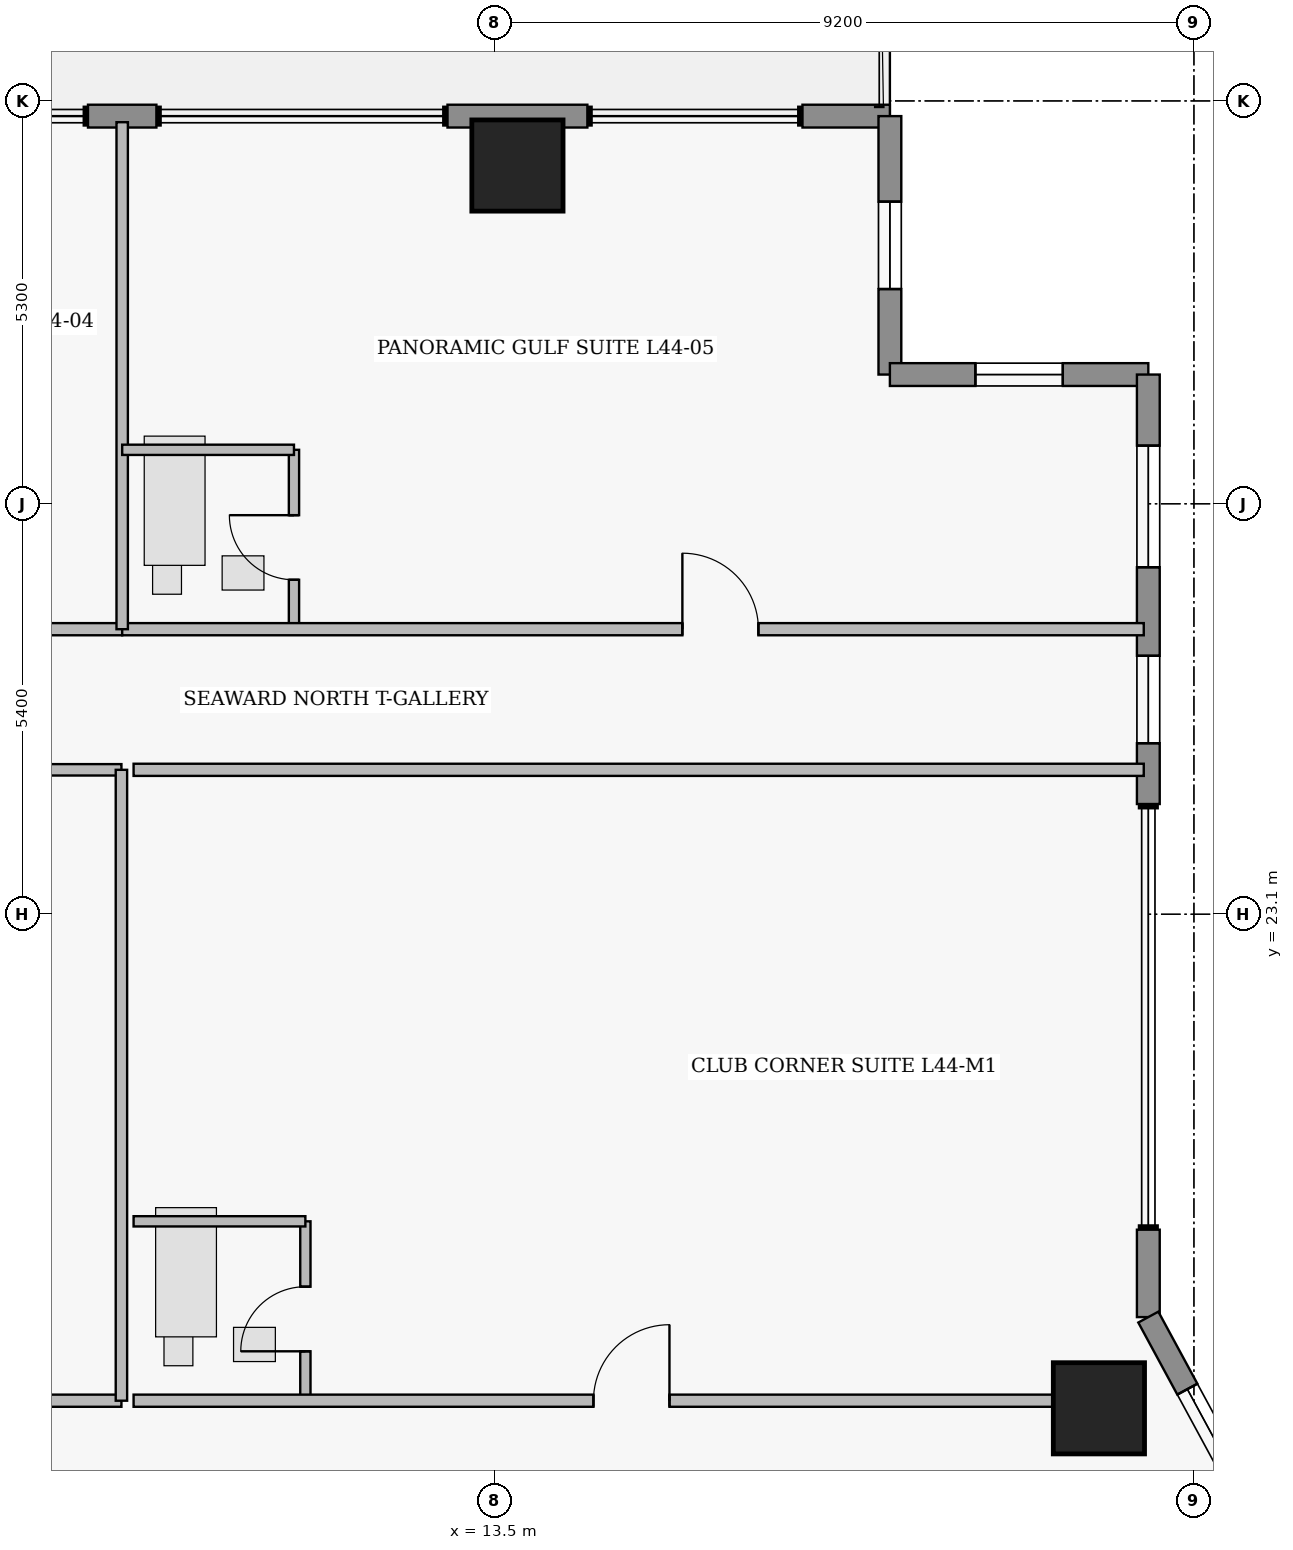
"""IFC4 building model, lengths in metres.
Left out: names, types, materials, properties, quantities, classifications, styles, units other than length and angle.
Written with IfcOpenShell. Run it as: python <this file> out.ifc"""

import sys

from ifc_helpers import new_model, si_unit, direction, frame, frame_2d, origin, origin_2d, place, context, subcontext, project, spatial, rectangle, extrude, element, fill, save


model = new_model("IFC4")
c1 = context("Model", 3, precision=1e-05, world=origin(), true_north=direction((0.0, 1.0)))
c2 = subcontext(c1, "Body", "Model", "MODEL_VIEW")
j1 = project(units=[si_unit("LENGTHUNIT", "METRE"), si_unit("PLANEANGLEUNIT", "RADIAN")], contexts=[c1])
p1 = place(None, origin())
s1 = spatial("IfcSite", under=j1, at=p1, CompositionType="ELEMENT")
p2 = place(p1, origin())
s2 = spatial("IfcBuilding", under=s1, at=p2, CompositionType="ELEMENT")
p3 = place(p2, frame((0.0, 0.0, 177.4)))
s3 = spatial("IfcBuildingStorey", under=s2, at=p3, CompositionType="ELEMENT", Elevation=177.4)
for number, where, z_axis, x_axis in (
    (1, (13.8, 32.95, 0.0), (0.0, 0.0, 1.0), (1.0, 0.0, 0.0)),
    (2, (21.45, 16.6, 0.0), (0.0, 0.0, 1.0), (1.0, 0.0, 0.0)),
):
    element("IfcColumn", number, at=place(p3, frame(where, z_axis=z_axis, x_axis=x_axis)), inside=s3, PredefinedType="COLUMN", context=c2, shape_type="SweptSolid", body=[
        extrude(rectangle(XDim=1.2, YDim=1.2, at=origin_2d()), origin(), (0.0, 0.0, 1.0), 3.75),
    ])
p4 = place(p3, frame((8.15, 33.6, 0.0), z_axis=(0.0, 0.0, 1.0), x_axis=(1.0, 0.0, 0.0)))
e3 = element("IfcWall", 3, at=p4, inside=s3, PredefinedType="STANDARD", context=c2, shape_type="SweptSolid", body=[
    extrude(rectangle(XDim=0.9, YDim=0.3, at=frame_2d((0.45, 0.0))), origin(), (0.0, 0.0, 1.0), 3.53),
])
p5 = place(p3, frame((12.88, 33.6, 0.0), z_axis=(0.0, 0.0, 1.0), x_axis=(1.0, 0.0, 0.0)))
e4 = element("IfcWall", 4, at=p5, inside=s3, PredefinedType="STANDARD", context=c2, shape_type="SweptSolid", body=[
    extrude(rectangle(XDim=1.84, YDim=0.3, at=frame_2d((0.92, 0.0))), origin(), (0.0, 0.0, 1.0), 3.53),
])
p6 = place(p3, frame((17.55, 33.6, 0.0), z_axis=(0.0, 0.0, 1.0), x_axis=(1.0, 0.0, 0.0)))
e5 = element("IfcWall", 5, at=p6, inside=s3, PredefinedType="STANDARD", context=c2, shape_type="SweptSolid", body=[
    extrude(rectangle(XDim=1.15, YDim=0.3, at=frame_2d((0.575, 0.0))), origin(), (0.0, 0.0, 1.0), 3.53),
])
p7 = place(p3, frame((18.7, 33.6, 0.0), z_axis=(0.0, 0.0, 1.0), x_axis=(0.0, -1.0, 0.0)))
e6 = element("IfcWall", 6, at=p7, inside=s3, PredefinedType="STANDARD", context=c2, shape_type="SweptSolid", body=[
    extrude(rectangle(XDim=3.4, YDim=0.3, at=frame_2d((1.7, 0.0))), origin(), (0.0, 0.0, 1.0), 3.53),
])
p8 = place(p7, frame((1.125, 0.0, 1.25)))
e7 = element("IfcOpeningElement", 7, at=p8, cuts=e6, PredefinedType="OPENING", context=c2, shape_type="SweptSolid", body=[
    extrude(rectangle(XDim=1.15, YDim=1.55, at=frame_2d((0.575, 0.775))), frame((0.0, 0.16, 0.0), z_axis=(0.0, -1.0, 0.0), x_axis=(1.0, 0.0, 0.0)), (0.0, 0.0, 1.0), 0.32),
])
p9 = place(p3, frame((18.7, 30.2, 0.0), z_axis=(0.0, 0.0, 1.0), x_axis=(1.0, 0.0, 0.0)))
e8 = element("IfcWall", 8, at=p9, inside=s3, PredefinedType="STANDARD", context=c2, shape_type="SweptSolid", body=[
    extrude(rectangle(XDim=3.4, YDim=0.3, at=frame_2d((1.7, 0.0))), origin(), (0.0, 0.0, 1.0), 3.53),
])
p10 = place(p9, frame((1.125, 0.0, 1.25)))
e9 = element("IfcOpeningElement", 9, at=p10, cuts=e8, PredefinedType="OPENING", context=c2, shape_type="SweptSolid", body=[
    extrude(rectangle(XDim=1.15, YDim=1.55, at=frame_2d((0.575, 0.775))), frame((0.0, 0.16, 0.0), z_axis=(0.0, -1.0, 0.0), x_axis=(1.0, 0.0, 0.0)), (0.0, 0.0, 1.0), 0.32),
])
p11 = place(p3, frame((22.1, 30.2, 0.0), z_axis=(0.0, 0.0, 1.0), x_axis=(0.0, -1.0, 0.0)))
e10 = element("IfcWall", 10, at=p11, inside=s3, PredefinedType="STANDARD", context=c2, shape_type="SweptSolid", body=[
    extrude(rectangle(XDim=5.65, YDim=0.3, at=frame_2d((2.825, 0.0))), origin(), (0.0, 0.0, 1.0), 3.53),
])
p12 = place(p11, frame((0.935, 0.0, 0.85)))
e11 = element("IfcOpeningElement", 11, at=p12, cuts=e10, PredefinedType="OPENING", context=c2, shape_type="SweptSolid", body=[
    extrude(rectangle(XDim=1.6, YDim=1.8, at=frame_2d((0.8, 0.9))), frame((0.0, 0.16, 0.0), z_axis=(0.0, -1.0, 0.0), x_axis=(1.0, 0.0, 0.0)), (0.0, 0.0, 1.0), 0.32),
])
p13 = place(p11, frame((3.7, 0.0, 0.95)))
e12 = element("IfcOpeningElement", 12, at=p13, cuts=e10, PredefinedType="OPENING", context=c2, shape_type="SweptSolid", body=[
    extrude(rectangle(XDim=1.15, YDim=1.55, at=frame_2d((0.575, 0.775))), frame((0.0, 0.16, 0.0), z_axis=(0.0, -1.0, 0.0), x_axis=(1.0, 0.0, 0.0)), (0.0, 0.0, 1.0), 0.32),
])
p14 = place(p3, frame((22.1, 18.95, 0.0), z_axis=(0.0, 0.0, 1.0), x_axis=(0.0, -1.0, 0.0)))
e13 = element("IfcWall", 13, at=p14, inside=s3, PredefinedType="STANDARD", context=c2, shape_type="SweptSolid", body=[
    extrude(rectangle(XDim=1.15, YDim=0.3, at=frame_2d((0.575, 0.0))), origin(), (0.0, 0.0, 1.0), 3.53),
])
p15 = place(p3, frame((22.1, 17.8, 0.0), z_axis=(0.0, 0.0, 1.0), x_axis=(0.476258655584, -0.879305233114, 0.0)))
e14 = element("IfcWall", 14, at=p15, inside=s3, PredefinedType="STANDARD", context=c2, shape_type="SweptSolid", body=[
    extrude(rectangle(XDim=5.459, YDim=0.3, at=frame_2d((2.729, 0.0))), origin(), (0.0, 0.0, 1.0), 3.53),
])
p16 = place(p15, frame((1.078, 0.0, 1.25)))
e15 = element("IfcOpeningElement", 15, at=p16, cuts=e14, PredefinedType="OPENING", context=c2, shape_type="SweptSolid", body=[
    extrude(rectangle(XDim=1.15, YDim=1.55, at=frame_2d((0.575, 0.775))), frame((0.0, 0.16, 0.0), z_axis=(0.0, -1.0, 0.0), x_axis=(1.0, 0.0, 0.0)), (0.0, 0.0, 1.0), 0.32),
])
p17 = place(p3, frame((1.8, 26.85, 0.0), z_axis=(0.0, 0.0, 1.0), x_axis=(1.0, 0.0, 0.0)))
e16 = element("IfcWall", 16, at=p17, inside=s3, PredefinedType="PARTITIONING", context=c2, shape_type="SweptSolid", body=[
    extrude(rectangle(XDim=6.8, YDim=0.16, at=frame_2d((3.4, 0.0))), origin(), (0.0, 0.0, 1.0), 3.53),
])
p18 = place(p17, frame((4.05, 0.0, 0.0)))
e17 = element("IfcOpeningElement", 17, at=p18, cuts=e16, PredefinedType="OPENING", context=c2, shape_type="SweptSolid", body=[
    extrude(rectangle(XDim=1.0, YDim=2.15, at=frame_2d((0.5, 1.075))), frame((0.0, 0.09, 0.0), z_axis=(0.0, -1.0, 0.0), x_axis=(1.0, 0.0, 0.0)), (0.0, 0.0, 1.0), 0.18),
])
p19 = place(p3, frame((10.86, 26.85, 0.0), z_axis=(0.0, 0.0, 1.0), x_axis=(0.0, 1.0, 0.0)))
e18 = element("IfcWall", 18, at=p19, inside=s3, PredefinedType="PLUMBINGWALL", context=c2, shape_type="SweptSolid", body=[
    extrude(rectangle(XDim=2.36, YDim=0.135, at=frame_2d((1.18, 0.0))), origin(), (0.0, 0.0, 1.0), 3.53),
])
p20 = place(p19, frame((0.65, 0.0, 0.0)))
e19 = element("IfcOpeningElement", 19, at=p20, cuts=e18, PredefinedType="OPENING", context=c2, shape_type="SweptSolid", body=[
    extrude(rectangle(XDim=0.85, YDim=2.1, at=frame_2d((0.425, 1.05))), frame((0.0, 0.077, 0.0), z_axis=(0.0, -1.0, 0.0), x_axis=(1.0, 0.0, 0.0)), (0.0, 0.0, 1.0), 0.155),
])
p21 = place(p3, frame((8.6, 26.85, 0.0), z_axis=(0.0, 0.0, 1.0), x_axis=(1.0, 0.0, 0.0)))
e20 = element("IfcWall", 20, at=p21, inside=s3, PredefinedType="PARTITIONING", context=c2, shape_type="SweptSolid", body=[
    extrude(rectangle(XDim=13.44, YDim=0.16, at=frame_2d((6.72, 0.0))), origin(), (0.0, 0.0, 1.0), 3.53),
])
p22 = place(p21, frame((7.37, 0.0, 0.0)))
e21 = element("IfcOpeningElement", 21, at=p22, cuts=e20, PredefinedType="OPENING", context=c2, shape_type="SweptSolid", body=[
    extrude(rectangle(XDim=1.0, YDim=2.15, at=frame_2d((0.5, 1.075))), frame((0.0, 0.09, 0.0), z_axis=(0.0, -1.0, 0.0), x_axis=(1.0, 0.0, 0.0)), (0.0, 0.0, 1.0), 0.18),
])
p23 = place(p3, frame((0.98, 16.7, 0.0), z_axis=(0.0, 0.0, 1.0), x_axis=(1.0, 0.0, 0.0)))
e22 = element("IfcWall", 22, at=p23, inside=s3, PredefinedType="PARTITIONING", context=c2, shape_type="SweptSolid", body=[
    extrude(rectangle(XDim=7.61, YDim=0.16, at=frame_2d((3.805, 0.0))), origin(), (0.0, 0.0, 1.0), 3.124),
])
p24 = place(p23, frame((5.43, 0.0, 0.0)))
e23 = element("IfcOpeningElement", 23, at=p24, cuts=e22, PredefinedType="OPENING", context=c2, shape_type="SweptSolid", body=[
    extrude(rectangle(XDim=1.08, YDim=2.18, at=frame_2d((0.54, 1.09))), frame((0.0, 0.09, 0.0), z_axis=(0.0, -1.0, 0.0), x_axis=(1.0, 0.0, 0.0)), (0.0, 0.0, 1.0), 0.18),
])
p25 = place(p3, frame((11.01, 16.7, 0.0), z_axis=(0.0, 0.0, 1.0), x_axis=(0.0, 1.0, 0.0)))
e24 = element("IfcWall", 24, at=p25, inside=s3, PredefinedType="PLUMBINGWALL", context=c2, shape_type="SweptSolid", body=[
    extrude(rectangle(XDim=2.36, YDim=0.135, at=frame_2d((1.18, 0.0))), origin(), (0.0, 0.0, 1.0), 3.53),
])
p26 = place(p25, frame((0.65, 0.0, 0.0)))
e25 = element("IfcOpeningElement", 25, at=p26, cuts=e24, PredefinedType="OPENING", context=c2, shape_type="SweptSolid", body=[
    extrude(rectangle(XDim=0.85, YDim=2.1, at=frame_2d((0.425, 1.05))), frame((0.0, 0.077, 0.0), z_axis=(0.0, -1.0, 0.0), x_axis=(1.0, 0.0, 0.0)), (0.0, 0.0, 1.0), 0.155),
])
p27 = place(p3, frame((8.75, 16.7, 0.0), z_axis=(0.0, 0.0, 1.0), x_axis=(1.0, 0.0, 0.0)))
e26 = element("IfcWall", 26, at=p27, inside=s3, PredefinedType="PARTITIONING", context=c2, shape_type="SweptSolid", body=[
    extrude(rectangle(XDim=13.29, YDim=0.16, at=frame_2d((6.645, 0.0))), origin(), (0.0, 0.0, 1.0), 3.124),
])
p28 = place(p27, frame((6.05, 0.0, 0.0)))
e27 = element("IfcOpeningElement", 27, at=p28, cuts=e26, PredefinedType="OPENING", context=c2, shape_type="SweptSolid", body=[
    extrude(rectangle(XDim=1.0, YDim=2.15, at=frame_2d((0.5, 1.075))), frame((0.0, 0.09, 0.0), z_axis=(0.0, -1.0, 0.0), x_axis=(1.0, 0.0, 0.0)), (0.0, 0.0, 1.0), 0.18),
])
p29 = place(p3, frame((8.6, 26.85, 0.0), z_axis=(0.0, 0.0, 1.0), x_axis=(0.0, 1.0, 0.0)))
e28 = element("IfcWall", 28, at=p29, inside=s3, PredefinedType="PARTITIONING", context=c2, shape_type="SweptSolid", body=[
    extrude(rectangle(XDim=6.67, YDim=0.15, at=frame_2d((3.335, 0.0))), origin(), (0.0, 0.0, 1.0), 3.53),
])
p30 = place(p3, frame((8.6, 29.21, 0.0), z_axis=(0.0, 0.0, 1.0), x_axis=(1.0, 0.0, 0.0)))
e29 = element("IfcWall", 29, at=p30, inside=s3, PredefinedType="PLUMBINGWALL", context=c2, shape_type="SweptSolid", body=[
    extrude(rectangle(XDim=2.26, YDim=0.135, at=frame_2d((1.13, 0.0))), origin(), (0.0, 0.0, 1.0), 3.53),
])
p31 = place(p3, frame((0.98, 25.0, 0.0), z_axis=(0.0, 0.0, 1.0), x_axis=(1.0, 0.0, 0.0)))
e30 = element("IfcWall", 30, at=p31, inside=s3, PredefinedType="PARTITIONING", context=c2, shape_type="SweptSolid", body=[
    extrude(rectangle(XDim=7.61, YDim=0.15, at=frame_2d((3.805, 0.0))), origin(), (0.0, 0.0, 1.0), 3.124),
])
p32 = place(p3, frame((8.59, 16.7, 0.0), z_axis=(0.0, 0.0, 1.0), x_axis=(0.0, 1.0, 0.0)))
e31 = element("IfcWall", 31, at=p32, inside=s3, PredefinedType="PARTITIONING", context=c2, shape_type="SweptSolid", body=[
    extrude(rectangle(XDim=8.3, YDim=0.15, at=frame_2d((4.15, 0.0))), origin(), (0.0, 0.0, 1.0), 3.53),
])
p33 = place(p3, frame((8.75, 19.06, 0.0), z_axis=(0.0, 0.0, 1.0), x_axis=(1.0, 0.0, 0.0)))
e32 = element("IfcWall", 32, at=p33, inside=s3, PredefinedType="PLUMBINGWALL", context=c2, shape_type="SweptSolid", body=[
    extrude(rectangle(XDim=2.26, YDim=0.135, at=frame_2d((1.13, 0.0))), origin(), (0.0, 0.0, 1.0), 3.124),
])
p34 = place(p3, frame((8.75, 25.0, 0.0), z_axis=(0.0, 0.0, 1.0), x_axis=(1.0, 0.0, 0.0)))
e33 = element("IfcWall", 33, at=p34, inside=s3, PredefinedType="PARTITIONING", context=c2, shape_type="SweptSolid", body=[
    extrude(rectangle(XDim=13.29, YDim=0.16, at=frame_2d((6.645, 0.0))), origin(), (0.0, 0.0, 1.0), 3.124),
])
p35 = place(p8, origin())
e34 = element("IfcWindow", 34, at=p35, inside=s3, PartitioningType="SINGLE_PANEL", PredefinedType="WINDOW", context=c2, shape_type="SweptSolid", body=[
    extrude(rectangle(XDim=1.15, YDim=1.55, at=frame_2d((0.575, 0.775))), frame((0.0, 0.03, 0.0), z_axis=(0.0, -1.0, 0.0), x_axis=(1.0, 0.0, 0.0)), (0.0, 0.0, 1.0), 0.06),
])
fill(e7, e34)
p36 = place(p10, origin())
e35 = element("IfcWindow", 35, at=p36, inside=s3, PartitioningType="SINGLE_PANEL", PredefinedType="WINDOW", context=c2, shape_type="SweptSolid", body=[
    extrude(rectangle(XDim=1.15, YDim=1.55, at=frame_2d((0.575, 0.775))), frame((0.0, 0.03, 0.0), z_axis=(0.0, -1.0, 0.0), x_axis=(1.0, 0.0, 0.0)), (0.0, 0.0, 1.0), 0.06),
])
fill(e9, e35)
p37 = place(p12, origin())
e36 = element("IfcWindow", 36, at=p37, inside=s3, PartitioningType="SINGLE_PANEL", PredefinedType="WINDOW", context=c2, shape_type="SweptSolid", body=[
    extrude(rectangle(XDim=1.6, YDim=1.8, at=frame_2d((0.8, 0.9))), frame((0.0, 0.03, 0.0), z_axis=(0.0, -1.0, 0.0), x_axis=(1.0, 0.0, 0.0)), (0.0, 0.0, 1.0), 0.06),
])
fill(e11, e36)
p38 = place(p13, origin())
e37 = element("IfcWindow", 37, at=p38, inside=s3, PartitioningType="SINGLE_PANEL", PredefinedType="WINDOW", context=c2, shape_type="SweptSolid", body=[
    extrude(rectangle(XDim=1.15, YDim=1.55, at=frame_2d((0.575, 0.775))), frame((0.0, 0.03, 0.0), z_axis=(0.0, -1.0, 0.0), x_axis=(1.0, 0.0, 0.0)), (0.0, 0.0, 1.0), 0.06),
])
fill(e12, e37)
p39 = place(p16, origin())
e38 = element("IfcWindow", 38, at=p39, inside=s3, PartitioningType="SINGLE_PANEL", PredefinedType="WINDOW", context=c2, shape_type="SweptSolid", body=[
    extrude(rectangle(XDim=1.15, YDim=1.55, at=frame_2d((0.575, 0.775))), frame((0.0, 0.03, 0.0), z_axis=(0.0, -1.0, 0.0), x_axis=(1.0, 0.0, 0.0)), (0.0, 0.0, 1.0), 0.06),
])
fill(e15, e38)
p40 = place(p20, origin())
e39 = element("IfcDoor", 39, at=p40, inside=s3, OperationType="SINGLE_SWING_RIGHT", PredefinedType="DOOR", context=c2, shape_type="SweptSolid", body=[
    extrude(rectangle(XDim=0.85, YDim=2.1, at=frame_2d((0.425, 1.05))), frame((0.0, 0.025, 0.0), z_axis=(0.0, -1.0, 0.0), x_axis=(1.0, 0.0, 0.0)), (0.0, 0.0, 1.0), 0.05),
])
fill(e19, e39)
p41 = place(p22, origin())
e40 = element("IfcDoor", 40, at=p41, inside=s3, OperationType="SINGLE_SWING_LEFT", PredefinedType="DOOR", context=c2, shape_type="SweptSolid", body=[
    extrude(rectangle(XDim=1.0, YDim=2.15, at=frame_2d((0.5, 1.075))), frame((0.0, 0.025, 0.0), z_axis=(0.0, -1.0, 0.0), x_axis=(1.0, 0.0, 0.0)), (0.0, 0.0, 1.0), 0.05),
])
fill(e21, e40)
p42 = place(p26, origin())
e41 = element("IfcDoor", 41, at=p42, inside=s3, OperationType="SINGLE_SWING_LEFT", PredefinedType="DOOR", context=c2, shape_type="SweptSolid", body=[
    extrude(rectangle(XDim=0.85, YDim=2.1, at=frame_2d((0.425, 1.05))), frame((0.0, 0.025, 0.0), z_axis=(0.0, -1.0, 0.0), x_axis=(1.0, 0.0, 0.0)), (0.0, 0.0, 1.0), 0.05),
])
fill(e25, e41)
p43 = place(p28, origin())
e42 = element("IfcDoor", 42, at=p43, inside=s3, OperationType="SINGLE_SWING_RIGHT", PredefinedType="DOOR", context=c2, shape_type="SweptSolid", body=[
    extrude(rectangle(XDim=1.0, YDim=2.15, at=frame_2d((0.5, 1.075))), frame((0.0, 0.025, 0.0), z_axis=(0.0, -1.0, 0.0), x_axis=(1.0, 0.0, 0.0)), (0.0, 0.0, 1.0), 0.05),
])
fill(e27, e42)
save(model, sys.argv[1])
